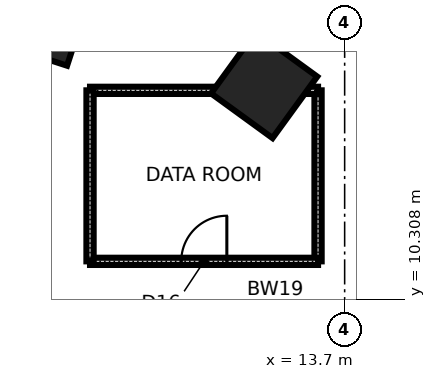
"""IFC4 building model, lengths in metres.
Left out: names, types, materials, properties, quantities, classifications, styles, units other than length and angle.
Written with IfcOpenShell. Run it as: python <this file> out.ifc"""

import sys

from ifc_helpers import new_model, si_unit, direction, frame, frame_2d, origin, origin_2d, place, context, subcontext, project, spatial, rectangle, extrude, element, fill, save


model = new_model("IFC4")
c1 = context("Model", 3, precision=1e-05, world=origin(), true_north=direction((0.0, 1.0)))
c2 = subcontext(c1, "Body", "Model", "MODEL_VIEW")
j1 = project(units=[si_unit("LENGTHUNIT", "METRE"), si_unit("PLANEANGLEUNIT", "RADIAN")], contexts=[c1])
p1 = place(None, origin())
s1 = spatial("IfcSite", under=j1, at=p1, CompositionType="ELEMENT")
p2 = place(p1, origin())
s2 = spatial("IfcBuilding", under=s1, at=p2, CompositionType="ELEMENT")
p3 = place(p2, frame((0.0, 0.0, 23.8)))
s3 = spatial("IfcBuildingStorey", under=s2, at=p3, CompositionType="ELEMENT", Elevation=23.8)
for number, where, z_axis, x_axis in (
    (1, (11.581, 15.94, 0.0), (0.0, 0.0, 1.0), (0.588, 0.809, 0.0)),
    (2, (5.754, 17.708, 0.0), (0.0, 0.0, 1.0), (0.309, 0.951, 0.0)),
):
    element("IfcColumn", number, at=place(p3, frame(where, z_axis=z_axis, x_axis=x_axis)), inside=s3, PredefinedType="COLUMN", context=c2, shape_type="SweptSolid", body=[
        extrude(rectangle(XDim=2.0, YDim=2.0, at=origin_2d()), origin(), (0.0, 0.0, 1.0), 4.2),
    ])
p4 = place(p3, frame((13.0, 15.8, 0.0), z_axis=(0.0, 0.0, 1.0), x_axis=(0.0, -1.0, 0.0)))
e3 = element("IfcWall", 3, at=p4, inside=s3, PredefinedType="SOLIDWALL", context=c2, shape_type="SweptSolid", body=[
    extrude(rectangle(XDim=4.5, YDim=0.19, at=frame_2d((2.25, 0.0))), origin(), (0.0, 0.0, 1.0), 4.04),
])
p5 = place(p3, frame((13.0, 11.3, 0.0), z_axis=(0.0, 0.0, 1.0), x_axis=(-1.0, 0.0, 0.0)))
e4 = element("IfcWall", 4, at=p5, inside=s3, PredefinedType="SOLIDWALL", context=c2, shape_type="SweptSolid", body=[
    extrude(rectangle(XDim=6.0, YDim=0.19, at=frame_2d((3.0, 0.0))), origin(), (0.0, 0.0, 1.0), 4.04),
])
p6 = place(p5, frame((2.4, 0.0, 0.0)))
e5 = element("IfcOpeningElement", 5, at=p6, cuts=e4, PredefinedType="OPENING", context=c2, shape_type="SweptSolid", body=[
    extrude(rectangle(XDim=1.2, YDim=2.1, at=frame_2d((0.6, 1.05))), frame((0.0, 0.105, 0.0), z_axis=(0.0, -1.0, 0.0), x_axis=(1.0, 0.0, 0.0)), (0.0, 0.0, 1.0), 0.21),
])
p7 = place(p3, frame((7.0, 15.8, 0.0), z_axis=(0.0, 0.0, 1.0), x_axis=(1.0, 0.0, 0.0)))
e6 = element("IfcWall", 6, at=p7, inside=s3, PredefinedType="SOLIDWALL", context=c2, shape_type="SweptSolid", body=[
    extrude(rectangle(XDim=6.0, YDim=0.19, at=frame_2d((3.0, 0.0))), origin(), (0.0, 0.0, 1.0), 4.04),
])
p8 = place(p3, frame((7.0, 11.3, 0.0), z_axis=(0.0, 0.0, 1.0), x_axis=(0.0, 1.0, 0.0)))
e7 = element("IfcWall", 7, at=p8, inside=s3, PredefinedType="SOLIDWALL", context=c2, shape_type="SweptSolid", body=[
    extrude(rectangle(XDim=4.5, YDim=0.19, at=frame_2d((2.25, 0.0))), origin(), (0.0, 0.0, 1.0), 4.04),
])
p9 = place(p6, frame((1.2, 0.0, 0.0), z_axis=(0.0, 0.0, 1.0), x_axis=(-1.0, 0.0, 0.0)))
e8 = element("IfcDoor", 8, at=p9, inside=s3, OperationType="SINGLE_SWING_RIGHT", PredefinedType="DOOR", context=c2, shape_type="SweptSolid", body=[
    extrude(rectangle(XDim=1.2, YDim=2.1, at=frame_2d((0.6, 1.05))), frame((0.0, 0.025, 0.0), z_axis=(0.0, -1.0, 0.0), x_axis=(1.0, 0.0, 0.0)), (0.0, 0.0, 1.0), 0.05),
])
fill(e5, e8)
save(model, sys.argv[1])
